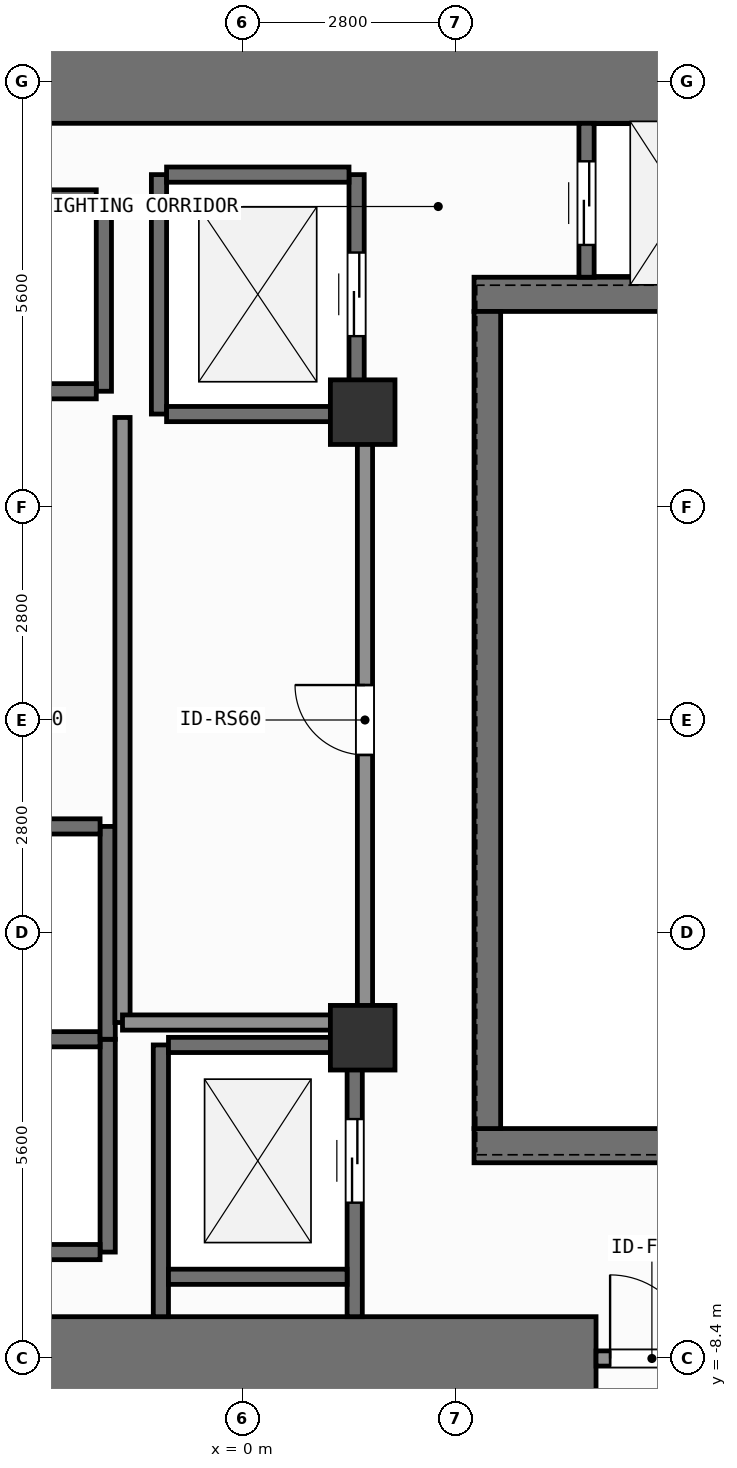
"""IFC4 building model, lengths in metres.
Left out: names, types, materials, properties, quantities, classifications, styles, units other than length and angle.
Written with IfcOpenShell. Run it as: python <this file> out.ifc"""

import sys

from ifc_helpers import new_model, si_unit, direction, frame, frame_2d, origin, origin_2d, place, context, subcontext, project, spatial, rectangle, extrude, element, fill, save


model = new_model("IFC4")
c1 = context("Model", 3, precision=1e-05, world=origin(), true_north=direction((0.0, 1.0)))
c2 = subcontext(c1, "Body", "Model", "MODEL_VIEW")
j1 = project(units=[si_unit("LENGTHUNIT", "METRE"), si_unit("PLANEANGLEUNIT", "RADIAN")], contexts=[c1])
p1 = place(None, origin())
s1 = spatial("IfcSite", under=j1, at=p1, CompositionType="ELEMENT")
p2 = place(p1, origin())
s2 = spatial("IfcBuilding", under=s1, at=p2, CompositionType="ELEMENT")
p3 = place(p2, frame((0.0, 0.0, 77.4)))
s3 = spatial("IfcBuildingStorey", under=s2, at=p3, CompositionType="ELEMENT", Elevation=77.4)
p4 = place(p3, frame((-2.62, -8.4, 0.0), z_axis=(0.0, 0.0, 1.0), x_axis=(1.0, 0.0, 0.0)))
e1 = element("IfcWall", 1, at=p4, inside=s3, PredefinedType="SHEAR", context=c2, shape_type="SweptSolid", body=[
    extrude(rectangle(XDim=7.27, YDim=1.1, at=frame_2d((3.635, 0.0))), origin(), (0.0, 0.0, 1.0), 7.8),
])
p5 = place(p3, frame((-7.55, 8.4, 0.0), z_axis=(0.0, 0.0, 1.0), x_axis=(1.0, 0.0, 0.0)))
e2 = element("IfcWall", 2, at=p5, inside=s3, PredefinedType="SHEAR", context=c2, shape_type="SweptSolid", body=[
    extrude(rectangle(XDim=16.5, YDim=1.1, at=frame_2d((8.25, 0.0))), origin(), (0.0, 0.0, 1.0), 7.8),
])
for number, where, z_axis, x_axis in (
    (3, (3.045, -5.6, 0.0), (0.0, 0.0, 1.0), (1.0, 0.0, 0.0)),
    (4, (3.045, 5.6, 0.0), (0.0, 0.0, 1.0), (1.0, 0.0, 0.0)),
):
    element("IfcWall", number, at=place(p3, frame(where, z_axis=z_axis, x_axis=x_axis)), inside=s3, PredefinedType="SHEAR", context=c2, shape_type="SweptSolid", body=[
        extrude(rectangle(XDim=5.905, YDim=0.45, at=frame_2d((2.953, 0.0))), origin(), (0.0, 0.0, 1.0), 7.8),
    ])
p6 = place(p3, frame((3.22, -5.375, 0.0), z_axis=(0.0, 0.0, 1.0), x_axis=(0.0, 1.0, 0.0)))
e5 = element("IfcWall", 5, at=p6, inside=s3, PredefinedType="SHEAR", context=c2, shape_type="SweptSolid", body=[
    extrude(rectangle(XDim=10.75, YDim=0.35, at=frame_2d((5.375, 0.0))), origin(), (0.0, 0.0, 1.0), 7.8),
])
for number, where, z_axis, x_axis in (
    (6, (1.58, -4.18, 0.0), (0.0, 0.0, 1.0), (1.0, 0.0, 0.0)),
    (7, (1.58, 4.05, 0.0), (0.0, 0.0, 1.0), (1.0, 0.0, 0.0)),
):
    element("IfcColumn", number, at=place(p3, frame(where, z_axis=z_axis, x_axis=x_axis)), inside=s3, PredefinedType="COLUMN", context=c2, shape_type="SweptSolid", body=[
        extrude(rectangle(XDim=0.85, YDim=0.85, at=origin_2d()), origin(), (0.0, 0.0, 1.0), 7.8),
    ])
p7 = place(p3, frame((-1.825, 4.325, 0.0), z_axis=(0.0, 0.0, 1.0), x_axis=(0.0, 1.0, 0.0)))
e8 = element("IfcWall", 8, at=p7, inside=s3, PredefinedType="SHEAR", context=c2, shape_type="SweptSolid", body=[
    extrude(rectangle(XDim=2.55, YDim=0.2, at=frame_2d((1.275, 0.0))), origin(), (0.0, 0.0, 1.0), 7.52),
])
for number, where, z_axis, x_axis in (
    (9, (-4.275, 4.325, 0.0), (0.0, 0.0, 1.0), (1.0, 0.0, 0.0)),
    (10, (-4.275, 6.875, 0.0), (0.0, 0.0, 1.0), (1.0, 0.0, 0.0)),
):
    element("IfcWall", number, at=place(p3, frame(where, z_axis=z_axis, x_axis=x_axis)), inside=s3, PredefinedType="SHEAR", context=c2, shape_type="SweptSolid", body=[
        extrude(rectangle(XDim=2.35, YDim=0.2, at=frame_2d((1.175, 0.0))), origin(), (0.0, 0.0, 1.0), 7.52),
    ])
p8 = place(p3, frame((-1.775, -7.0, 0.0), z_axis=(0.0, 0.0, 1.0), x_axis=(0.0, 1.0, 0.0)))
e11 = element("IfcWall", 11, at=p8, inside=s3, PredefinedType="SHEAR", context=c2, shape_type="SweptSolid", body=[
    extrude(rectangle(XDim=2.8, YDim=0.2, at=frame_2d((1.4, 0.0))), origin(), (0.0, 0.0, 1.0), 7.52),
])
for number, where, z_axis, x_axis in (
    (12, (-4.325, -7.0, 0.0), (0.0, 0.0, 1.0), (1.0, 0.0, 0.0)),
    (13, (-4.325, -4.2, 0.0), (0.0, 0.0, 1.0), (1.0, 0.0, 0.0)),
):
    element("IfcWall", number, at=place(p3, frame(where, z_axis=z_axis, x_axis=x_axis)), inside=s3, PredefinedType="SHEAR", context=c2, shape_type="SweptSolid", body=[
        extrude(rectangle(XDim=2.45, YDim=0.2, at=frame_2d((1.225, 0.0))), origin(), (0.0, 0.0, 1.0), 7.52),
    ])
p9 = place(p3, frame((-1.775, -4.2, 0.0), z_axis=(0.0, 0.0, 1.0), x_axis=(0.0, 1.0, 0.0)))
e14 = element("IfcWall", 14, at=p9, inside=s3, PredefinedType="SHEAR", context=c2, shape_type="SweptSolid", body=[
    extrude(rectangle(XDim=2.8, YDim=0.2, at=frame_2d((1.4, 0.0))), origin(), (0.0, 0.0, 1.0), 7.52),
])
p10 = place(p3, frame((-4.325, -1.4, 0.0), z_axis=(0.0, 0.0, 1.0), x_axis=(1.0, 0.0, 0.0)))
e15 = element("IfcWall", 15, at=p10, inside=s3, PredefinedType="SHEAR", context=c2, shape_type="SweptSolid", body=[
    extrude(rectangle(XDim=2.45, YDim=0.2, at=frame_2d((1.225, 0.0))), origin(), (0.0, 0.0, 1.0), 7.52),
])
p11 = place(p3, frame((-1.1, 4.025, 0.0), z_axis=(0.0, 0.0, 1.0), x_axis=(0.0, 1.0, 0.0)))
e16 = element("IfcWall", 16, at=p11, inside=s3, PredefinedType="SHEAR", context=c2, shape_type="SweptSolid", body=[
    extrude(rectangle(XDim=3.15, YDim=0.2, at=frame_2d((1.575, 0.0))), origin(), (0.0, 0.0, 1.0), 7.52),
])
p12 = place(p3, frame((1.5, 4.025, 0.0), z_axis=(0.0, 0.0, 1.0), x_axis=(0.0, 1.0, 0.0)))
e17 = element("IfcWall", 17, at=p12, inside=s3, PredefinedType="SHEAR", context=c2, shape_type="SweptSolid", body=[
    extrude(rectangle(XDim=3.15, YDim=0.2, at=frame_2d((1.575, 0.0))), origin(), (0.0, 0.0, 1.0), 7.52),
])
p13 = place(p12, frame((1.025, 0.0, 0.0)))
e18 = element("IfcOpeningElement", 18, at=p13, cuts=e17, PredefinedType="OPENING", context=c2, shape_type="SweptSolid", body=[
    extrude(rectangle(XDim=1.1, YDim=2.2, at=frame_2d((0.55, 1.1))), frame((0.0, 0.11, 0.0), z_axis=(0.0, -1.0, 0.0), x_axis=(1.0, 0.0, 0.0)), (0.0, 0.0, 1.0), 0.22),
])
for number, where, z_axis, x_axis in (
    (19, (-1.0, 4.025, 0.0), (0.0, 0.0, 1.0), (1.0, 0.0, 0.0)),
    (20, (-1.0, 7.175, 0.0), (0.0, 0.0, 1.0), (1.0, 0.0, 0.0)),
):
    element("IfcWall", number, at=place(p3, frame(where, z_axis=z_axis, x_axis=x_axis)), inside=s3, PredefinedType="SHEAR", context=c2, shape_type="SweptSolid", body=[
        extrude(rectangle(XDim=2.4, YDim=0.2, at=frame_2d((1.2, 0.0))), origin(), (0.0, 0.0, 1.0), 7.52),
    ])
p14 = place(p3, frame((-1.075, -7.85, 0.0), z_axis=(0.0, 0.0, 1.0), x_axis=(0.0, 1.0, 0.0)))
e21 = element("IfcWall", 21, at=p14, inside=s3, PredefinedType="SHEAR", context=c2, shape_type="SweptSolid", body=[
    extrude(rectangle(XDim=3.575, YDim=0.2, at=frame_2d((1.788, 0.0))), origin(), (0.0, 0.0, 1.0), 7.52),
])
p15 = place(p3, frame((1.475, -7.85, 0.0), z_axis=(0.0, 0.0, 1.0), x_axis=(0.0, 1.0, 0.0)))
e22 = element("IfcWall", 22, at=p15, inside=s3, PredefinedType="SHEAR", context=c2, shape_type="SweptSolid", body=[
    extrude(rectangle(XDim=3.575, YDim=0.2, at=frame_2d((1.788, 0.0))), origin(), (0.0, 0.0, 1.0), 7.52),
])
p16 = place(p15, frame((1.5, 0.0, 0.0)))
e23 = element("IfcOpeningElement", 23, at=p16, cuts=e22, PredefinedType="OPENING", context=c2, shape_type="SweptSolid", body=[
    extrude(rectangle(XDim=1.1, YDim=2.2, at=frame_2d((0.55, 1.1))), frame((0.0, 0.11, 0.0), z_axis=(0.0, -1.0, 0.0), x_axis=(1.0, 0.0, 0.0)), (0.0, 0.0, 1.0), 0.22),
])
for number, where, z_axis, x_axis in (
    (24, (-0.975, -7.325, 0.0), (0.0, 0.0, 1.0), (1.0, 0.0, 0.0)),
    (25, (-0.975, -4.275, 0.0), (0.0, 0.0, 1.0), (1.0, 0.0, 0.0)),
):
    element("IfcWall", number, at=place(p3, frame(where, z_axis=z_axis, x_axis=x_axis)), inside=s3, PredefinedType="SHEAR", context=c2, shape_type="SweptSolid", body=[
        extrude(rectangle(XDim=2.35, YDim=0.2, at=frame_2d((1.175, 0.0))), origin(), (0.0, 0.0, 1.0), 7.52),
    ])
p17 = place(p3, frame((4.525, 5.825, 0.0), z_axis=(0.0, 0.0, 1.0), x_axis=(0.0, 1.0, 0.0)))
e26 = element("IfcWall", 26, at=p17, inside=s3, PredefinedType="SHEAR", context=c2, shape_type="SweptSolid", body=[
    extrude(rectangle(XDim=2.025, YDim=0.2, at=frame_2d((1.013, 0.0))), origin(), (0.0, 0.0, 1.0), 7.52),
])
p18 = place(p17, frame((0.425, 0.0, 0.0)))
e27 = element("IfcOpeningElement", 27, at=p18, cuts=e26, PredefinedType="OPENING", context=c2, shape_type="SweptSolid", body=[
    extrude(rectangle(XDim=1.1, YDim=2.2, at=frame_2d((0.55, 1.1))), frame((0.0, 0.11, 0.0), z_axis=(0.0, -1.0, 0.0), x_axis=(1.0, 0.0, 0.0)), (0.0, 0.0, 1.0), 0.22),
])
p19 = place(p3, frame((4.65, -8.4, 0.0), z_axis=(0.0, 0.0, 1.0), x_axis=(1.0, 0.0, 0.0)))
e28 = element("IfcWall", 28, at=p19, inside=s3, PredefinedType="SOLIDWALL", context=c2, shape_type="SweptSolid", body=[
    extrude(rectangle(XDim=1.47, YDim=0.2, at=frame_2d((0.735, 0.0))), origin(), (0.0, 0.0, 1.0), 6.56),
])
p20 = place(p19, frame((0.185, 0.0, 0.0)))
e29 = element("IfcOpeningElement", 29, at=p20, cuts=e28, PredefinedType="OPENING", context=c2, shape_type="SweptSolid", body=[
    extrude(rectangle(XDim=1.1, YDim=2.15, at=frame_2d((0.55, 1.075))), frame((0.0, 0.11, 0.0), z_axis=(0.0, -1.0, 0.0), x_axis=(1.0, 0.0, 0.0)), (0.0, 0.0, 1.0), 0.22),
])
p21 = place(p3, frame((1.61, -3.98, 0.0), z_axis=(0.0, 0.0, 1.0), x_axis=(0.0, 1.0, 0.0)))
e30 = element("IfcWall", 30, at=p21, inside=s3, PredefinedType="SOLIDWALL", context=c2, shape_type="SweptSolid", body=[
    extrude(rectangle(XDim=7.96, YDim=0.2, at=frame_2d((3.98, 0.0))), origin(), (0.0, 0.0, 1.0), 7.52),
])
p22 = place(p21, frame((3.52, 0.0, 0.0)))
e31 = element("IfcOpeningElement", 31, at=p22, cuts=e30, PredefinedType="OPENING", context=c2, shape_type="SweptSolid", body=[
    extrude(rectangle(XDim=0.92, YDim=2.1, at=frame_2d((0.46, 1.05))), frame((0.0, 0.11, 0.0), z_axis=(0.0, -1.0, 0.0), x_axis=(1.0, 0.0, 0.0)), (0.0, 0.0, 1.0), 0.22),
])
p23 = place(p3, frame((-1.58, -3.98, 0.0), z_axis=(0.0, 0.0, 1.0), x_axis=(0.0, 1.0, 0.0)))
e32 = element("IfcWall", 32, at=p23, inside=s3, PredefinedType="SOLIDWALL", context=c2, shape_type="SweptSolid", body=[
    extrude(rectangle(XDim=7.96, YDim=0.2, at=frame_2d((3.98, 0.0))), origin(), (0.0, 0.0, 1.0), 7.52),
])
p24 = place(p3, frame((-1.58, -3.98, 0.0), z_axis=(0.0, 0.0, 1.0), x_axis=(1.0, 0.0, 0.0)))
e33 = element("IfcWall", 33, at=p24, inside=s3, PredefinedType="SOLIDWALL", context=c2, shape_type="SweptSolid", body=[
    extrude(rectangle(XDim=3.19, YDim=0.2, at=frame_2d((1.595, 0.0))), origin(), (0.0, 0.0, 1.0), 7.52),
])
p25 = place(p13, origin())
e34 = element("IfcDoor", 34, at=p25, inside=s3, OperationType="SLIDING_TO_LEFT", PredefinedType="DOOR", context=c2, shape_type="SweptSolid", body=[
    extrude(rectangle(XDim=1.1, YDim=2.2, at=frame_2d((0.55, 1.1))), frame((0.0, 0.025, 0.0), z_axis=(0.0, -1.0, 0.0), x_axis=(1.0, 0.0, 0.0)), (0.0, 0.0, 1.0), 0.05),
])
fill(e18, e34)
p26 = place(p16, origin())
e35 = element("IfcDoor", 35, at=p26, inside=s3, OperationType="SLIDING_TO_LEFT", PredefinedType="DOOR", context=c2, shape_type="SweptSolid", body=[
    extrude(rectangle(XDim=1.1, YDim=2.2, at=frame_2d((0.55, 1.1))), frame((0.0, 0.025, 0.0), z_axis=(0.0, -1.0, 0.0), x_axis=(1.0, 0.0, 0.0)), (0.0, 0.0, 1.0), 0.05),
])
fill(e23, e35)
p27 = place(p18, origin())
e36 = element("IfcDoor", 36, at=p27, inside=s3, OperationType="SLIDING_TO_LEFT", PredefinedType="DOOR", context=c2, shape_type="SweptSolid", body=[
    extrude(rectangle(XDim=1.1, YDim=2.2, at=frame_2d((0.55, 1.1))), frame((0.0, 0.025, 0.0), z_axis=(0.0, -1.0, 0.0), x_axis=(1.0, 0.0, 0.0)), (0.0, 0.0, 1.0), 0.05),
])
fill(e27, e36)
p28 = place(p20, origin())
e37 = element("IfcDoor", 37, at=p28, inside=s3, OperationType="SINGLE_SWING_LEFT", PredefinedType="DOOR", context=c2, shape_type="SweptSolid", body=[
    extrude(rectangle(XDim=1.1, YDim=2.15, at=frame_2d((0.55, 1.075))), frame((0.0, 0.025, 0.0), z_axis=(0.0, -1.0, 0.0), x_axis=(1.0, 0.0, 0.0)), (0.0, 0.0, 1.0), 0.05),
])
fill(e29, e37)
p29 = place(p22, origin())
e38 = element("IfcDoor", 38, at=p29, inside=s3, OperationType="SINGLE_SWING_RIGHT", PredefinedType="DOOR", context=c2, shape_type="SweptSolid", body=[
    extrude(rectangle(XDim=0.92, YDim=2.1, at=frame_2d((0.46, 1.05))), frame((0.0, 0.025, 0.0), z_axis=(0.0, -1.0, 0.0), x_axis=(1.0, 0.0, 0.0)), (0.0, 0.0, 1.0), 0.05),
])
fill(e31, e38)
save(model, sys.argv[1])
